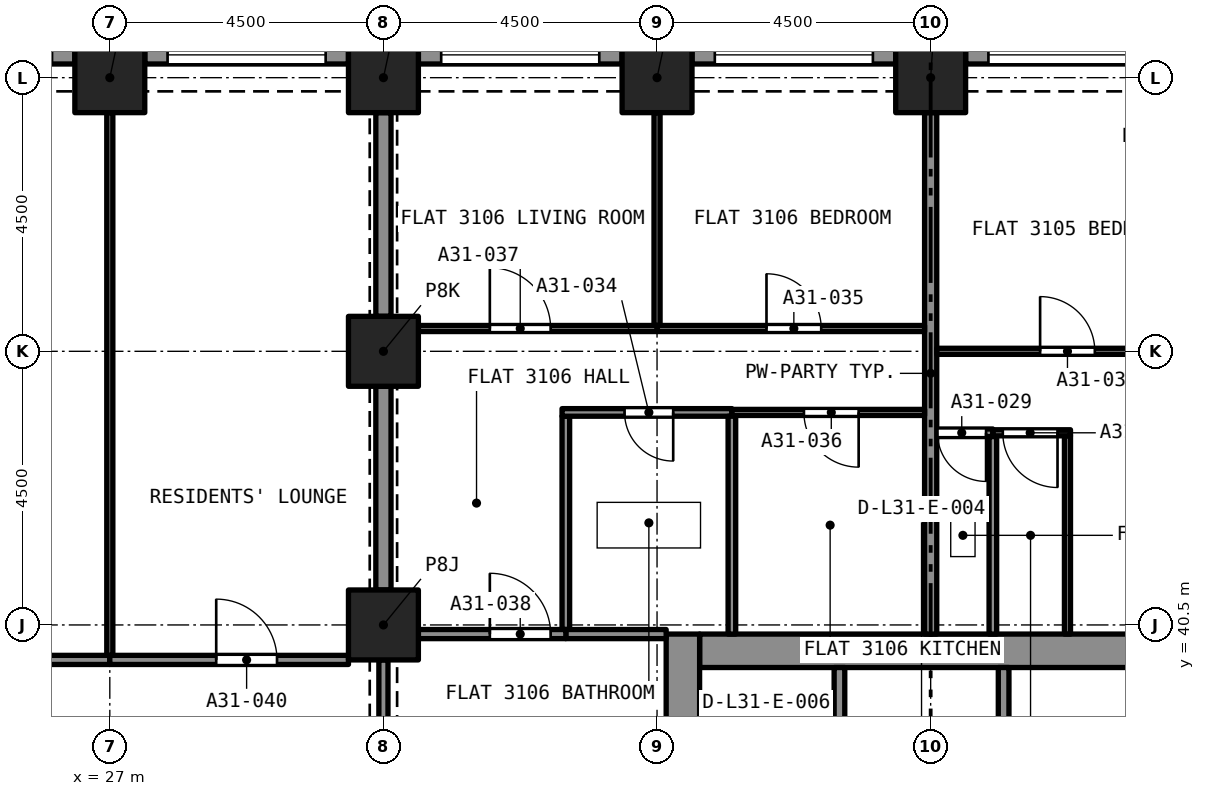
"""IFC4 building model, lengths in metres.
Left out: names, types, materials, properties, quantities, classifications, styles, units other than length and angle.
Written with IfcOpenShell. Run it as: python <this file> out.ifc"""

import sys

from ifc_helpers import new_model, si_unit, direction, frame, frame_2d, origin, origin_2d, place, context, subcontext, project, spatial, rectangle, extrude, element, fill, save


model = new_model("IFC4")
c1 = context("Model", 3, precision=1e-05, world=origin(), true_north=direction((0.0, 1.0)))
c2 = subcontext(c1, "Body", "Model", "MODEL_VIEW")
j1 = project(units=[si_unit("LENGTHUNIT", "METRE"), si_unit("PLANEANGLEUNIT", "RADIAN")], contexts=[c1])
p1 = place(None, origin())
s1 = spatial("IfcSite", under=j1, at=p1, CompositionType="ELEMENT")
p2 = place(p1, origin())
s2 = spatial("IfcBuilding", under=s1, at=p2, CompositionType="ELEMENT")
p3 = place(p2, frame((0.0, 0.0, 112.0)))
s3 = spatial("IfcBuildingStorey", under=s2, at=p3, CompositionType="ELEMENT", Elevation=112.0)
for number, where, z_axis, x_axis in (
    (1, (31.5, 40.5, 0.0), (0.0, 0.0, 1.0), (1.0, 0.0, 0.0)),
    (2, (31.5, 45.0, 0.0), (0.0, 0.0, 1.0), (1.0, 0.0, 0.0)),
    (3, (27.0, 49.5, 0.0), (0.0, 0.0, 1.0), (1.0, 0.0, 0.0)),
    (4, (31.5, 49.5, 0.0), (0.0, 0.0, 1.0), (1.0, 0.0, 0.0)),
    (5, (36.0, 49.5, 0.0), (0.0, 0.0, 1.0), (1.0, 0.0, 0.0)),
    (6, (40.5, 49.5, 0.0), (0.0, 0.0, 1.0), (1.0, 0.0, 0.0)),
):
    element("IfcColumn", number, at=place(p3, frame(where, z_axis=z_axis, x_axis=x_axis)), inside=s3, PredefinedType="COLUMN", context=c2, shape_type="SweptSolid", body=[
        extrude(rectangle(XDim=1.15, YDim=1.15, at=origin_2d()), origin(), (0.0, 0.0, 1.0), 3.2),
    ])
p4 = place(p3, frame((36.7, 40.075, 0.0), z_axis=(0.0, 0.0, 1.0), x_axis=(1.0, 0.0, 0.0)))
e7 = element("IfcWall", 7, at=p4, inside=s3, PredefinedType="SOLIDWALL", context=c2, shape_type="SweptSolid", body=[
    extrude(rectangle(XDim=7.6, YDim=0.55, at=frame_2d((3.8, 0.0))), origin(), (0.0, 0.0, 1.0), 3.2),
])
p5 = place(p3, frame((36.425, 27.15, 0.0), z_axis=(0.0, 0.0, 1.0), x_axis=(0.0, 1.0, 0.0)))
e8 = element("IfcWall", 8, at=p5, inside=s3, PredefinedType="SOLIDWALL", context=c2, shape_type="SweptSolid", body=[
    extrude(rectangle(XDim=13.2, YDim=0.55, at=frame_2d((6.6, 0.0))), origin(), (0.0, 0.0, 1.0), 3.2),
])
p6 = place(p5, frame((8.8, 0.0, 0.0)))
e9 = element("IfcOpeningElement", 9, at=p6, cuts=e8, PredefinedType="OPENING", context=c2, shape_type="SweptSolid", body=[
    extrude(rectangle(XDim=1.2, YDim=2.1, at=frame_2d((0.6, 1.05))), frame((0.0, 0.285, 0.0), z_axis=(0.0, -1.0, 0.0), x_axis=(1.0, 0.0, 0.0)), (0.0, 0.0, 1.0), 0.57),
])
p7 = place(p3, frame((41.075, 49.875, 0.0), z_axis=(0.0, 0.0, 1.0), x_axis=(1.0, 0.0, 0.0)))
e10 = element("IfcWall", 10, at=p7, inside=s3, PredefinedType="SOLIDWALL", context=c2, shape_type="SweptSolid", body=[
    extrude(rectangle(XDim=3.35, YDim=0.3, at=frame_2d((1.675, 0.0))), origin(), (0.0, 0.0, 1.0), 3.2),
])
p8 = place(p7, frame((0.375, 0.0, 0.45)))
e11 = element("IfcOpeningElement", 11, at=p8, cuts=e10, PredefinedType="OPENING", context=c2, shape_type="SweptSolid", body=[
    extrude(rectangle(XDim=2.6, YDim=1.95, at=frame_2d((1.3, 0.975))), frame((0.0, 0.16, 0.0), z_axis=(0.0, -1.0, 0.0), x_axis=(1.0, 0.0, 0.0)), (0.0, 0.0, 1.0), 0.32),
])
p9 = place(p3, frame((36.575, 49.875, 0.0), z_axis=(0.0, 0.0, 1.0), x_axis=(1.0, 0.0, 0.0)))
e12 = element("IfcWall", 12, at=p9, inside=s3, PredefinedType="SOLIDWALL", context=c2, shape_type="SweptSolid", body=[
    extrude(rectangle(XDim=3.35, YDim=0.3, at=frame_2d((1.675, 0.0))), origin(), (0.0, 0.0, 1.0), 3.2),
])
p10 = place(p9, frame((0.375, 0.0, 0.45)))
e13 = element("IfcOpeningElement", 13, at=p10, cuts=e12, PredefinedType="OPENING", context=c2, shape_type="SweptSolid", body=[
    extrude(rectangle(XDim=2.6, YDim=1.95, at=frame_2d((1.3, 0.975))), frame((0.0, 0.16, 0.0), z_axis=(0.0, -1.0, 0.0), x_axis=(1.0, 0.0, 0.0)), (0.0, 0.0, 1.0), 0.32),
])
p11 = place(p3, frame((32.075, 49.875, 0.0), z_axis=(0.0, 0.0, 1.0), x_axis=(1.0, 0.0, 0.0)))
e14 = element("IfcWall", 14, at=p11, inside=s3, PredefinedType="SOLIDWALL", context=c2, shape_type="SweptSolid", body=[
    extrude(rectangle(XDim=3.35, YDim=0.3, at=frame_2d((1.675, 0.0))), origin(), (0.0, 0.0, 1.0), 3.2),
])
p12 = place(p11, frame((0.375, 0.0, 0.45)))
e15 = element("IfcOpeningElement", 15, at=p12, cuts=e14, PredefinedType="OPENING", context=c2, shape_type="SweptSolid", body=[
    extrude(rectangle(XDim=2.6, YDim=1.95, at=frame_2d((1.3, 0.975))), frame((0.0, 0.16, 0.0), z_axis=(0.0, -1.0, 0.0), x_axis=(1.0, 0.0, 0.0)), (0.0, 0.0, 1.0), 0.32),
])
p13 = place(p3, frame((27.575, 49.875, 0.0), z_axis=(0.0, 0.0, 1.0), x_axis=(1.0, 0.0, 0.0)))
e16 = element("IfcWall", 16, at=p13, inside=s3, PredefinedType="SOLIDWALL", context=c2, shape_type="SweptSolid", body=[
    extrude(rectangle(XDim=3.35, YDim=0.3, at=frame_2d((1.675, 0.0))), origin(), (0.0, 0.0, 1.0), 3.2),
])
p14 = place(p13, frame((0.375, 0.0, 0.45)))
e17 = element("IfcOpeningElement", 17, at=p14, cuts=e16, PredefinedType="OPENING", context=c2, shape_type="SweptSolid", body=[
    extrude(rectangle(XDim=2.6, YDim=1.95, at=frame_2d((1.3, 0.975))), frame((0.0, 0.16, 0.0), z_axis=(0.0, -1.0, 0.0), x_axis=(1.0, 0.0, 0.0)), (0.0, 0.0, 1.0), 0.32),
])
p15 = place(p3, frame((23.075, 49.875, 0.0), z_axis=(0.0, 0.0, 1.0), x_axis=(1.0, 0.0, 0.0)))
e18 = element("IfcWall", 18, at=p15, inside=s3, PredefinedType="SOLIDWALL", context=c2, shape_type="SweptSolid", body=[
    extrude(rectangle(XDim=3.35, YDim=0.3, at=frame_2d((1.675, 0.0))), origin(), (0.0, 0.0, 1.0), 3.2),
])
p16 = place(p15, frame((0.375, 0.0, 0.45)))
e19 = element("IfcOpeningElement", 19, at=p16, cuts=e18, PredefinedType="OPENING", context=c2, shape_type="SweptSolid", body=[
    extrude(rectangle(XDim=2.6, YDim=1.95, at=frame_2d((1.3, 0.975))), frame((0.0, 0.16, 0.0), z_axis=(0.0, -1.0, 0.0), x_axis=(1.0, 0.0, 0.0)), (0.0, 0.0, 1.0), 0.32),
])
p17 = place(p3, frame((41.523, 43.66, 0.0), z_axis=(0.0, 0.0, 1.0), x_axis=(-1.0, 0.0, 0.0)))
e20 = element("IfcWall", 20, at=p17, inside=s3, PredefinedType="PARTITIONING", context=c2, shape_type="SweptSolid", body=[
    extrude(rectangle(XDim=0.923, YDim=0.125, at=frame_2d((0.461, 0.0))), origin(), (0.0, 0.0, 1.0), 2.9),
])
p18 = place(p17, frame((0.111, 0.0, 0.0)))
e21 = element("IfcOpeningElement", 21, at=p18, cuts=e20, PredefinedType="OPENING", context=c2, shape_type="SweptSolid", body=[
    extrude(rectangle(XDim=0.8, YDim=2.1, at=frame_2d((0.4, 1.05))), frame((0.0, 0.073, 0.0), z_axis=(0.0, -1.0, 0.0), x_axis=(1.0, 0.0, 0.0)), (0.0, 0.0, 1.0), 0.145),
])
p19 = place(p3, frame((41.523, 40.35, 0.0), z_axis=(0.0, 0.0, 1.0), x_axis=(0.0, 1.0, 0.0)))
e22 = element("IfcWall", 22, at=p19, inside=s3, PredefinedType="PARTITIONING", context=c2, shape_type="SweptSolid", body=[
    extrude(rectangle(XDim=3.247, YDim=0.125, at=frame_2d((1.624, 0.0))), origin(), (0.0, 0.0, 1.0), 2.9),
])
p20 = place(p3, frame((40.5, 40.35, 0.0), z_axis=(0.0, 0.0, 1.0), x_axis=(0.0, 1.0, 0.0)))
e23 = element("IfcWall", 23, at=p20, inside=s3, PredefinedType="PARTITIONING", context=c2, shape_type="SweptSolid", body=[
    extrude(rectangle(XDim=8.575, YDim=0.2, at=frame_2d((4.288, 0.0))), origin(), (0.0, 0.0, 1.0), 2.9),
])
p21 = place(p3, frame((40.6, 45.0, 0.0), z_axis=(0.0, 0.0, 1.0), x_axis=(1.0, 0.0, 0.0)))
e24 = element("IfcWall", 24, at=p21, inside=s3, PredefinedType="PARTITIONING", context=c2, shape_type="SweptSolid", body=[
    extrude(rectangle(XDim=4.4, YDim=0.1, at=frame_2d((2.2, 0.0))), origin(), (0.0, 0.0, 1.0), 2.9),
])
p22 = place(p21, frame((1.7, 0.0, 0.0)))
e25 = element("IfcOpeningElement", 25, at=p22, cuts=e24, PredefinedType="OPENING", context=c2, shape_type="SweptSolid", body=[
    extrude(rectangle(XDim=0.9, YDim=2.1, at=frame_2d((0.45, 1.05))), frame((0.0, 0.06, 0.0), z_axis=(0.0, -1.0, 0.0), x_axis=(1.0, 0.0, 0.0)), (0.0, 0.0, 1.0), 0.12),
])
p23 = place(p3, frame((42.75, 40.35, 0.0), z_axis=(0.0, 0.0, 1.0), x_axis=(0.0, 1.0, 0.0)))
e26 = element("IfcWall", 26, at=p23, inside=s3, PredefinedType="PARTITIONING", context=c2, shape_type="SweptSolid", body=[
    extrude(rectangle(XDim=3.26, YDim=0.1, at=frame_2d((1.63, 0.0))), origin(), (0.0, 0.0, 1.0), 2.9),
])
p24 = place(p3, frame((42.8, 43.66, 0.0), z_axis=(0.0, 0.0, 1.0), x_axis=(-1.0, 0.0, 0.0)))
e27 = element("IfcWall", 27, at=p24, inside=s3, PredefinedType="PARTITIONING", context=c2, shape_type="SweptSolid", body=[
    extrude(rectangle(XDim=1.277, YDim=0.1, at=frame_2d((0.639, 0.0))), origin(), (0.0, 0.0, 1.0), 2.9),
])
p25 = place(p24, frame((0.214, 0.0, 0.0)))
e28 = element("IfcOpeningElement", 28, at=p25, cuts=e27, PredefinedType="OPENING", context=c2, shape_type="SweptSolid", body=[
    extrude(rectangle(XDim=0.9, YDim=2.1, at=frame_2d((0.45, 1.05))), frame((0.0, 0.06, 0.0), z_axis=(0.0, -1.0, 0.0), x_axis=(1.0, 0.0, 0.0)), (0.0, 0.0, 1.0), 0.12),
])
p26 = place(p3, frame((34.5, 40.425, 0.0), z_axis=(0.0, 0.0, 1.0), x_axis=(0.0, 1.0, 0.0)))
e29 = element("IfcWall", 29, at=p26, inside=s3, PredefinedType="PARTITIONING", context=c2, shape_type="SweptSolid", body=[
    extrude(rectangle(XDim=3.508, YDim=0.125, at=frame_2d((1.754, 0.0))), origin(), (0.0, 0.0, 1.0), 2.9),
])
p27 = place(p3, frame((37.231, 43.995, 0.0), z_axis=(0.0, 0.0, 1.0), x_axis=(-1.0, 0.0, 0.0)))
e30 = element("IfcWall", 30, at=p27, inside=s3, PredefinedType="PARTITIONING", context=c2, shape_type="SweptSolid", body=[
    extrude(rectangle(XDim=2.794, YDim=0.125, at=frame_2d((1.397, 0.0))), origin(), (0.0, 0.0, 1.0), 2.9),
])
p28 = place(p27, frame((0.966, 0.0, 0.0)))
e31 = element("IfcOpeningElement", 31, at=p28, cuts=e30, PredefinedType="OPENING", context=c2, shape_type="SweptSolid", body=[
    extrude(rectangle(XDim=0.8, YDim=2.1, at=frame_2d((0.4, 1.05))), frame((0.0, 0.073, 0.0), z_axis=(0.0, -1.0, 0.0), x_axis=(1.0, 0.0, 0.0)), (0.0, 0.0, 1.0), 0.145),
])
p29 = place(p3, frame((37.231, 40.35, 0.0), z_axis=(0.0, 0.0, 1.0), x_axis=(0.0, 1.0, 0.0)))
e32 = element("IfcWall", 32, at=p29, inside=s3, PredefinedType="PARTITIONING", context=c2, shape_type="SweptSolid", body=[
    extrude(rectangle(XDim=3.583, YDim=0.125, at=frame_2d((1.791, 0.0))), origin(), (0.0, 0.0, 1.0), 2.9),
])
p30 = place(p3, frame((34.5, 40.35, 0.0), z_axis=(0.0, 0.0, 1.0), x_axis=(1.0, 0.0, 0.0)))
e33 = element("IfcWall", 33, at=p30, inside=s3, PredefinedType="PARTITIONING", context=c2, shape_type="SweptSolid", body=[
    extrude(rectangle(XDim=1.65, YDim=0.15, at=frame_2d((0.825, 0.0))), origin(), (0.0, 0.0, 1.0), 2.9),
])
p31 = place(p3, frame((36.0, 45.375, 0.0), z_axis=(0.0, 0.0, 1.0), x_axis=(1.0, 0.0, 0.0)))
e34 = element("IfcWall", 34, at=p31, inside=s3, PredefinedType="PARTITIONING", context=c2, shape_type="SweptSolid", body=[
    extrude(rectangle(XDim=4.4, YDim=0.1, at=frame_2d((2.2, 0.0))), origin(), (0.0, 0.0, 1.0), 2.9),
])
p32 = place(p31, frame((1.8, 0.0, 0.0)))
e35 = element("IfcOpeningElement", 35, at=p32, cuts=e34, PredefinedType="OPENING", context=c2, shape_type="SweptSolid", body=[
    extrude(rectangle(XDim=0.9, YDim=2.1, at=frame_2d((0.45, 1.05))), frame((0.0, 0.06, 0.0), z_axis=(0.0, -1.0, 0.0), x_axis=(1.0, 0.0, 0.0)), (0.0, 0.0, 1.0), 0.12),
])
p33 = place(p3, frame((36.0, 45.425, 0.0), z_axis=(0.0, 0.0, 1.0), x_axis=(0.0, 1.0, 0.0)))
e36 = element("IfcWall", 36, at=p33, inside=s3, PredefinedType="PARTITIONING", context=c2, shape_type="SweptSolid", body=[
    extrude(rectangle(XDim=3.5, YDim=0.1, at=frame_2d((1.75, 0.0))), origin(), (0.0, 0.0, 1.0), 2.9),
])
p34 = place(p3, frame((40.4, 43.995, 0.0), z_axis=(0.0, 0.0, 1.0), x_axis=(-1.0, 0.0, 0.0)))
e37 = element("IfcWall", 37, at=p34, inside=s3, PredefinedType="PARTITIONING", context=c2, shape_type="SweptSolid", body=[
    extrude(rectangle(XDim=3.168, YDim=0.1, at=frame_2d((1.584, 0.0))), origin(), (0.0, 0.0, 1.0), 2.9),
])
p35 = place(p34, frame((1.084, 0.0, 0.0)))
e38 = element("IfcOpeningElement", 38, at=p35, cuts=e37, PredefinedType="OPENING", context=c2, shape_type="SweptSolid", body=[
    extrude(rectangle(XDim=0.9, YDim=2.1, at=frame_2d((0.45, 1.05))), frame((0.0, 0.06, 0.0), z_axis=(0.0, -1.0, 0.0), x_axis=(1.0, 0.0, 0.0)), (0.0, 0.0, 1.0), 0.12),
])
p36 = place(p3, frame((32.075, 45.375, 0.0), z_axis=(0.0, 0.0, 1.0), x_axis=(1.0, 0.0, 0.0)))
e39 = element("IfcWall", 39, at=p36, inside=s3, PredefinedType="PARTITIONING", context=c2, shape_type="SweptSolid", body=[
    extrude(rectangle(XDim=3.925, YDim=0.1, at=frame_2d((1.962, 0.0))), origin(), (0.0, 0.0, 1.0), 2.9),
])
p37 = place(p36, frame((1.175, 0.0, 0.0)))
e40 = element("IfcOpeningElement", 40, at=p37, cuts=e39, PredefinedType="OPENING", context=c2, shape_type="SweptSolid", body=[
    extrude(rectangle(XDim=1.0, YDim=2.1, at=frame_2d((0.5, 1.05))), frame((0.0, 0.06, 0.0), z_axis=(0.0, -1.0, 0.0), x_axis=(1.0, 0.0, 0.0)), (0.0, 0.0, 1.0), 0.12),
])
p38 = place(p3, frame((31.5, 41.075, 0.0), z_axis=(0.0, 0.0, 1.0), x_axis=(0.0, 1.0, 0.0)))
e41 = element("IfcWall", 41, at=p38, inside=s3, PredefinedType="PARTITIONING", context=c2, shape_type="SweptSolid", body=[
    extrude(rectangle(XDim=3.35, YDim=0.25, at=frame_2d((1.675, 0.0))), origin(), (0.0, 0.0, 1.0), 2.38),
])
p39 = place(p3, frame((32.075, 40.35, 0.0), z_axis=(0.0, 0.0, 1.0), x_axis=(1.0, 0.0, 0.0)))
e42 = element("IfcWall", 42, at=p39, inside=s3, PredefinedType="PARTITIONING", context=c2, shape_type="SweptSolid", body=[
    extrude(rectangle(XDim=2.425, YDim=0.15, at=frame_2d((1.212, 0.0))), origin(), (0.0, 0.0, 1.0), 2.9),
])
p40 = place(p39, frame((1.175, 0.0, 0.0)))
e43 = element("IfcOpeningElement", 43, at=p40, cuts=e42, PredefinedType="OPENING", context=c2, shape_type="SweptSolid", body=[
    extrude(rectangle(XDim=1.0, YDim=2.1, at=frame_2d((0.5, 1.05))), frame((0.0, 0.085, 0.0), z_axis=(0.0, -1.0, 0.0), x_axis=(1.0, 0.0, 0.0)), (0.0, 0.0, 1.0), 0.17),
])
p41 = place(p3, frame((31.5, 45.575, 0.0), z_axis=(0.0, 0.0, 1.0), x_axis=(0.0, 1.0, 0.0)))
e44 = element("IfcWall", 44, at=p41, inside=s3, PredefinedType="PARTITIONING", context=c2, shape_type="SweptSolid", body=[
    extrude(rectangle(XDim=3.35, YDim=0.25, at=frame_2d((1.675, 0.0))), origin(), (0.0, 0.0, 1.0), 2.38),
])
p42 = place(p3, frame((18.575, 39.925, 0.0), z_axis=(0.0, 0.0, 1.0), x_axis=(1.0, 0.0, 0.0)))
e45 = element("IfcWall", 45, at=p42, inside=s3, PredefinedType="PARTITIONING", context=c2, shape_type="SweptSolid", body=[
    extrude(rectangle(XDim=8.425, YDim=0.15, at=frame_2d((4.212, 0.0))), origin(), (0.0, 0.0, 1.0), 2.75),
])
p43 = place(p42, frame((3.425, 0.0, 0.0)))
e46 = element("IfcOpeningElement", 46, at=p43, cuts=e45, PredefinedType="OPENING", context=c2, shape_type="SweptSolid", body=[
    extrude(rectangle(XDim=1.0, YDim=2.1, at=frame_2d((0.5, 1.05))), frame((0.0, 0.085, 0.0), z_axis=(0.0, -1.0, 0.0), x_axis=(1.0, 0.0, 0.0)), (0.0, 0.0, 1.0), 0.17),
])
p44 = place(p3, frame((27.0, 39.925, 0.0), z_axis=(0.0, 0.0, 1.0), x_axis=(1.0, 0.0, 0.0)))
e47 = element("IfcWall", 47, at=p44, inside=s3, PredefinedType="PARTITIONING", context=c2, shape_type="SweptSolid", body=[
    extrude(rectangle(XDim=3.925, YDim=0.15, at=frame_2d((1.962, 0.0))), origin(), (0.0, 0.0, 1.0), 2.75),
])
p45 = place(p44, frame((1.75, 0.0, 0.0)))
e48 = element("IfcOpeningElement", 48, at=p45, cuts=e47, PredefinedType="OPENING", context=c2, shape_type="SweptSolid", body=[
    extrude(rectangle(XDim=1.0, YDim=2.1, at=frame_2d((0.5, 1.05))), frame((0.0, 0.085, 0.0), z_axis=(0.0, -1.0, 0.0), x_axis=(1.0, 0.0, 0.0)), (0.0, 0.0, 1.0), 0.17),
])
p46 = place(p3, frame((31.5, 36.575, 0.0), z_axis=(0.0, 0.0, 1.0), x_axis=(0.0, 1.0, 0.0)))
e49 = element("IfcWall", 49, at=p46, inside=s3, PredefinedType="PARTITIONING", context=c2, shape_type="SweptSolid", body=[
    extrude(rectangle(XDim=3.35, YDim=0.15, at=frame_2d((1.675, 0.0))), origin(), (0.0, 0.0, 1.0), 2.38),
])
p47 = place(p46, frame((1.075, 0.0, 0.0)))
e50 = element("IfcOpeningElement", 50, at=p47, cuts=e49, PredefinedType="OPENING", context=c2, shape_type="SweptSolid", body=[
    extrude(rectangle(XDim=1.2, YDim=2.1, at=frame_2d((0.6, 1.05))), frame((0.0, 0.085, 0.0), z_axis=(0.0, -1.0, 0.0), x_axis=(1.0, 0.0, 0.0)), (0.0, 0.0, 1.0), 0.17),
])
p48 = place(p3, frame((27.0, 40.0, 0.0), z_axis=(0.0, 0.0, 1.0), x_axis=(0.0, 1.0, 0.0)))
e51 = element("IfcWall", 51, at=p48, inside=s3, PredefinedType="PARTITIONING", context=c2, shape_type="SweptSolid", body=[
    extrude(rectangle(XDim=8.925, YDim=0.1, at=frame_2d((4.462, 0.0))), origin(), (0.0, 0.0, 1.0), 2.75),
])
for number, where, z_axis, x_axis in (
    (52, (41.7, 37.5, 0.0), (0.0, 0.0, 1.0), (0.0, 1.0, 0.0)),
    (53, (39.0, 37.5, 0.0), (0.0, 0.0, 1.0), (0.0, 1.0, 0.0)),
):
    element("IfcWall", number, at=place(p3, frame(where, z_axis=z_axis, x_axis=x_axis)), inside=s3, PredefinedType="SOLIDWALL", context=c2, shape_type="SweptSolid", body=[
        extrude(rectangle(XDim=2.3, YDim=0.175, at=frame_2d((1.15, 0.0))), origin(), (0.0, 0.0, 1.0), 2.9),
    ])
p49 = place(p8, origin())
e54 = element("IfcWindow", 54, at=p49, inside=s3, PartitioningType="SINGLE_PANEL", PredefinedType="WINDOW", context=c2, shape_type="SweptSolid", body=[
    extrude(rectangle(XDim=2.6, YDim=1.95, at=frame_2d((1.3, 0.975))), frame((0.0, 0.03, 0.0), z_axis=(0.0, -1.0, 0.0), x_axis=(1.0, 0.0, 0.0)), (0.0, 0.0, 1.0), 0.06),
])
fill(e11, e54)
p50 = place(p10, origin())
e55 = element("IfcWindow", 55, at=p50, inside=s3, PartitioningType="SINGLE_PANEL", PredefinedType="WINDOW", context=c2, shape_type="SweptSolid", body=[
    extrude(rectangle(XDim=2.6, YDim=1.95, at=frame_2d((1.3, 0.975))), frame((0.0, 0.03, 0.0), z_axis=(0.0, -1.0, 0.0), x_axis=(1.0, 0.0, 0.0)), (0.0, 0.0, 1.0), 0.06),
])
fill(e13, e55)
p51 = place(p12, origin())
e56 = element("IfcWindow", 56, at=p51, inside=s3, PartitioningType="SINGLE_PANEL", PredefinedType="WINDOW", context=c2, shape_type="SweptSolid", body=[
    extrude(rectangle(XDim=2.6, YDim=1.95, at=frame_2d((1.3, 0.975))), frame((0.0, 0.03, 0.0), z_axis=(0.0, -1.0, 0.0), x_axis=(1.0, 0.0, 0.0)), (0.0, 0.0, 1.0), 0.06),
])
fill(e15, e56)
p52 = place(p14, origin())
e57 = element("IfcWindow", 57, at=p52, inside=s3, PartitioningType="SINGLE_PANEL", PredefinedType="WINDOW", context=c2, shape_type="SweptSolid", body=[
    extrude(rectangle(XDim=2.6, YDim=1.95, at=frame_2d((1.3, 0.975))), frame((0.0, 0.03, 0.0), z_axis=(0.0, -1.0, 0.0), x_axis=(1.0, 0.0, 0.0)), (0.0, 0.0, 1.0), 0.06),
])
fill(e17, e57)
p53 = place(p18, origin())
e58 = element("IfcDoor", 58, at=p53, inside=s3, OperationType="SINGLE_SWING_RIGHT", PredefinedType="DOOR", context=c2, shape_type="SweptSolid", body=[
    extrude(rectangle(XDim=0.8, YDim=2.1, at=frame_2d((0.4, 1.05))), frame((0.0, 0.025, 0.0), z_axis=(0.0, -1.0, 0.0), x_axis=(1.0, 0.0, 0.0)), (0.0, 0.0, 1.0), 0.05),
])
fill(e21, e58)
p54 = place(p22, origin())
e59 = element("IfcDoor", 59, at=p54, inside=s3, OperationType="SINGLE_SWING_LEFT", PredefinedType="DOOR", context=c2, shape_type="SweptSolid", body=[
    extrude(rectangle(XDim=0.9, YDim=2.1, at=frame_2d((0.45, 1.05))), frame((0.0, 0.025, 0.0), z_axis=(0.0, -1.0, 0.0), x_axis=(1.0, 0.0, 0.0)), (0.0, 0.0, 1.0), 0.05),
])
fill(e25, e59)
p55 = place(p25, origin())
e60 = element("IfcDoor", 60, at=p55, inside=s3, OperationType="SINGLE_SWING_RIGHT", PredefinedType="DOOR", context=c2, shape_type="SweptSolid", body=[
    extrude(rectangle(XDim=0.9, YDim=2.1, at=frame_2d((0.45, 1.05))), frame((0.0, 0.025, 0.0), z_axis=(0.0, -1.0, 0.0), x_axis=(1.0, 0.0, 0.0)), (0.0, 0.0, 1.0), 0.05),
])
fill(e28, e60)
p56 = place(p28, origin())
e61 = element("IfcDoor", 61, at=p56, inside=s3, OperationType="SINGLE_SWING_LEFT", PredefinedType="DOOR", context=c2, shape_type="SweptSolid", body=[
    extrude(rectangle(XDim=0.8, YDim=2.1, at=frame_2d((0.4, 1.05))), frame((0.0, 0.025, 0.0), z_axis=(0.0, -1.0, 0.0), x_axis=(1.0, 0.0, 0.0)), (0.0, 0.0, 1.0), 0.05),
])
fill(e31, e61)
p57 = place(p32, origin())
e62 = element("IfcDoor", 62, at=p57, inside=s3, OperationType="SINGLE_SWING_RIGHT", PredefinedType="DOOR", context=c2, shape_type="SweptSolid", body=[
    extrude(rectangle(XDim=0.9, YDim=2.1, at=frame_2d((0.45, 1.05))), frame((0.0, 0.025, 0.0), z_axis=(0.0, -1.0, 0.0), x_axis=(1.0, 0.0, 0.0)), (0.0, 0.0, 1.0), 0.05),
])
fill(e35, e62)
p58 = place(p35, origin())
e63 = element("IfcDoor", 63, at=p58, inside=s3, OperationType="SINGLE_SWING_LEFT", PredefinedType="DOOR", context=c2, shape_type="SweptSolid", body=[
    extrude(rectangle(XDim=0.9, YDim=2.1, at=frame_2d((0.45, 1.05))), frame((0.0, 0.025, 0.0), z_axis=(0.0, -1.0, 0.0), x_axis=(1.0, 0.0, 0.0)), (0.0, 0.0, 1.0), 0.05),
])
fill(e38, e63)
p59 = place(p37, origin())
e64 = element("IfcDoor", 64, at=p59, inside=s3, OperationType="SINGLE_SWING_LEFT", PredefinedType="DOOR", context=c2, shape_type="SweptSolid", body=[
    extrude(rectangle(XDim=1.0, YDim=2.1, at=frame_2d((0.5, 1.05))), frame((0.0, 0.025, 0.0), z_axis=(0.0, -1.0, 0.0), x_axis=(1.0, 0.0, 0.0)), (0.0, 0.0, 1.0), 0.05),
])
fill(e40, e64)
p60 = place(p40, origin())
e65 = element("IfcDoor", 65, at=p60, inside=s3, OperationType="SINGLE_SWING_RIGHT", PredefinedType="DOOR", context=c2, shape_type="SweptSolid", body=[
    extrude(rectangle(XDim=1.0, YDim=2.1, at=frame_2d((0.5, 1.05))), frame((0.0, 0.025, 0.0), z_axis=(0.0, -1.0, 0.0), x_axis=(1.0, 0.0, 0.0)), (0.0, 0.0, 1.0), 0.05),
])
fill(e43, e65)
p61 = place(p45, origin())
e66 = element("IfcDoor", 66, at=p61, inside=s3, OperationType="SINGLE_SWING_RIGHT", PredefinedType="DOOR", context=c2, shape_type="SweptSolid", body=[
    extrude(rectangle(XDim=1.0, YDim=2.1, at=frame_2d((0.5, 1.05))), frame((0.0, 0.025, 0.0), z_axis=(0.0, -1.0, 0.0), x_axis=(1.0, 0.0, 0.0)), (0.0, 0.0, 1.0), 0.05),
])
fill(e48, e66)
save(model, sys.argv[1])
